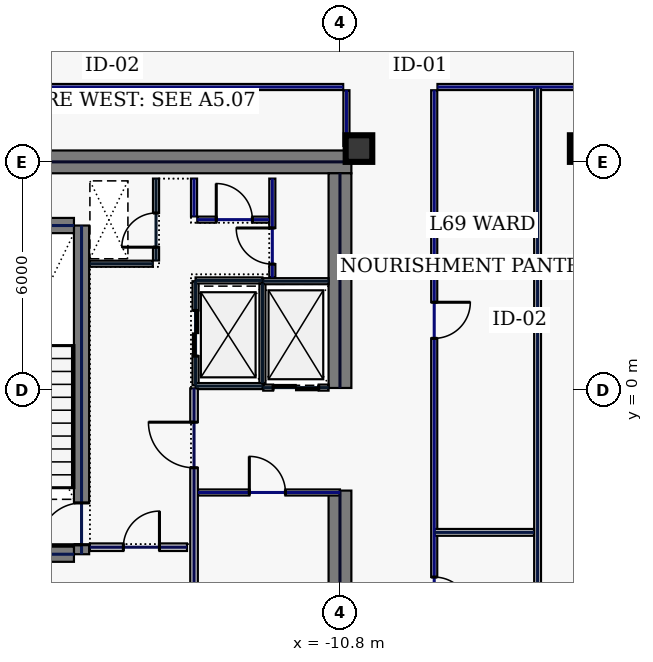
"""IFC4 building model, lengths in metres.
Left out: names, types, materials, properties, quantities, classifications, styles, units other than length and angle.
Written with IfcOpenShell. Run it as: python <this file> out.ifc"""

import sys

from ifc_helpers import new_model, si_unit, direction, frame, frame_2d, origin, origin_2d, place, context, subcontext, project, spatial, rectangle, hollow_rectangle, extrude, element, fill, save


model = new_model("IFC4")
c1 = context("Model", 3, precision=1e-05, world=origin(), true_north=direction((0.0, 1.0)))
c2 = subcontext(c1, "Body", "Model", "MODEL_VIEW")
j1 = project(units=[si_unit("LENGTHUNIT", "METRE"), si_unit("PLANEANGLEUNIT", "RADIAN")], contexts=[c1])
p1 = place(None, origin())
s1 = spatial("IfcSite", under=j1, at=p1, CompositionType="ELEMENT")
p2 = place(p1, origin())
s2 = spatial("IfcBuilding", under=s1, at=p2, CompositionType="ELEMENT")
p3 = place(p2, frame((0.0, 0.0, 297.0)))
s3 = spatial("IfcBuildingStorey", under=s2, at=p3, CompositionType="ELEMENT", Elevation=297.0)
p4 = place(p3, frame((-22.0, 6.0, 0.0), z_axis=(0.0, 0.0, 1.0), x_axis=(1.0, 0.0, 0.0)))
e1 = element("IfcWall", 1, at=p4, inside=s3, PredefinedType="SHEAR", context=c2, shape_type="SweptSolid", body=[
    extrude(rectangle(XDim=11.5, YDim=0.6, at=frame_2d((5.75, 0.0))), origin(), (0.0, 0.0, 1.0), 3.74),
])
p5 = place(p3, frame((-10.8, -5.7, 0.0), z_axis=(0.0, 0.0, 1.0), x_axis=(0.0, 1.0, 0.0)))
e2 = element("IfcWall", 2, at=p5, inside=s3, PredefinedType="SHEAR", context=c2, shape_type="SweptSolid", body=[
    extrude(rectangle(XDim=3.05, YDim=0.6, at=frame_2d((1.525, 0.0))), origin(), (0.0, 0.0, 1.0), 3.74),
])
p6 = place(p3, frame((-10.8, 0.05, 0.0), z_axis=(0.0, 0.0, 1.0), x_axis=(0.0, 1.0, 0.0)))
e3 = element("IfcWall", 3, at=p6, inside=s3, PredefinedType="SHEAR", context=c2, shape_type="SweptSolid", body=[
    extrude(rectangle(XDim=5.65, YDim=0.6, at=frame_2d((2.825, 0.0))), origin(), (0.0, 0.0, 1.0), 3.74),
])
p7 = place(p3, frame((-17.6, -4.325, 0.0), z_axis=(0.0, 0.0, 1.0), x_axis=(0.0, 1.0, 0.0)))
e4 = element("IfcWall", 4, at=p7, inside=s3, PredefinedType="SHEAR", context=c2, shape_type="SweptSolid", body=[
    extrude(rectangle(XDim=8.65, YDim=0.4, at=frame_2d((4.325, 0.0))), origin(), (0.0, 0.0, 1.0), 3.74),
])
p8 = place(p7, frame((0.25, 0.0, 0.0)))
e5 = element("IfcOpeningElement", 5, at=p8, cuts=e4, PredefinedType="OPENING", context=c2, shape_type="SweptSolid", body=[
    extrude(rectangle(XDim=1.1, YDim=2.2, at=frame_2d((0.55, 1.1))), frame((0.0, 0.21, 0.0), z_axis=(0.0, -1.0, 0.0), x_axis=(1.0, 0.0, 0.0)), (0.0, 0.0, 1.0), 0.42),
])
for number, where, z_axis, x_axis in (
    (6, (-21.2, -4.325, 0.0), (0.0, 0.0, 1.0), (1.0, 0.0, 0.0)),
    (7, (-21.2, 4.325, 0.0), (0.0, 0.0, 1.0), (1.0, 0.0, 0.0)),
):
    element("IfcWall", number, at=place(p3, frame(where, z_axis=z_axis, x_axis=x_axis)), inside=s3, PredefinedType="SHEAR", context=c2, shape_type="SweptSolid", body=[
        extrude(rectangle(XDim=3.4, YDim=0.4, at=frame_2d((1.7, 0.0))), origin(), (0.0, 0.0, 1.0), 3.74),
    ])
for number, where, z_axis, x_axis in (
    (8, (-10.3, 6.35, 0.0), (0.0, 0.0, 1.0), (1.0, 0.0, 0.0)),
    (9, (-4.4, 6.35, 0.0), (0.0, 0.0, 1.0), (1.0, 0.0, 0.0)),
):
    element("IfcColumn", number, at=place(p3, frame(where, z_axis=z_axis, x_axis=x_axis)), inside=s3, PredefinedType="COLUMN", context=c2, shape_type="SweptSolid", body=[
        extrude(hollow_rectangle(XDim=0.7, YDim=0.7, WallThickness=0.032, at=origin_2d()), origin(), (0.0, 0.0, 1.0), 3.74),
    ])
p9 = place(p3, frame((-14.6, 0.12, 0.0), z_axis=(0.0, 0.0, 1.0), x_axis=(0.0, 1.0, 0.0)))
e10 = element("IfcWall", 10, at=p9, inside=s3, PredefinedType="PARTITIONING", context=c2, shape_type="SweptSolid", body=[
    extrude(rectangle(XDim=2.74, YDim=0.16, at=frame_2d((1.37, 0.0))), origin(), (0.0, 0.0, 1.0), 3.74),
])
p10 = place(p9, frame((0.77, 0.0, 0.0)))
e11 = element("IfcOpeningElement", 11, at=p10, cuts=e10, PredefinedType="OPENING", context=c2, shape_type="SweptSolid", body=[
    extrude(rectangle(XDim=1.2, YDim=2.2, at=frame_2d((0.6, 1.1))), frame((0.0, 0.09, 0.0), z_axis=(0.0, -1.0, 0.0), x_axis=(1.0, 0.0, 0.0)), (0.0, 0.0, 1.0), 0.18),
])
for number, where, z_axis, x_axis in (
    (12, (-14.6, 0.1, 0.0), (0.0, 0.0, 1.0), (1.0, 0.0, 0.0)),
    (13, (-14.6, 2.88, 0.0), (0.0, 0.0, 1.0), (1.0, 0.0, 0.0)),
):
    element("IfcWall", number, at=place(p3, frame(where, z_axis=z_axis, x_axis=x_axis)), inside=s3, PredefinedType="PARTITIONING", context=c2, shape_type="SweptSolid", body=[
        extrude(rectangle(XDim=1.76, YDim=0.16, at=frame_2d((0.88, 0.0))), origin(), (0.0, 0.0, 1.0), 3.74),
    ])
p11 = place(p3, frame((-12.84, 0.18, 0.0), z_axis=(0.0, 0.0, 1.0), x_axis=(0.0, 1.0, 0.0)))
e14 = element("IfcWall", 14, at=p11, inside=s3, PredefinedType="PARTITIONING", context=c2, shape_type="SweptSolid", body=[
    extrude(rectangle(XDim=2.62, YDim=0.16, at=frame_2d((1.31, 0.0))), origin(), (0.0, 0.0, 1.0), 3.74),
])
p12 = place(p3, frame((-12.82, 0.06, 0.0), z_axis=(0.0, 0.0, 1.0), x_axis=(1.0, 0.0, 0.0)))
e15 = element("IfcWall", 15, at=p12, inside=s3, PredefinedType="PARTITIONING", context=c2, shape_type="SweptSolid", body=[
    extrude(rectangle(XDim=1.72, YDim=0.16, at=frame_2d((0.86, 0.0))), origin(), (0.0, 0.0, 1.0), 3.74),
])
p13 = place(p12, frame((0.26, 0.0, 0.0)))
e16 = element("IfcOpeningElement", 16, at=p13, cuts=e15, PredefinedType="OPENING", context=c2, shape_type="SweptSolid", body=[
    extrude(rectangle(XDim=1.2, YDim=2.2, at=frame_2d((0.6, 1.1))), frame((0.0, 0.09, 0.0), z_axis=(0.0, -1.0, 0.0), x_axis=(1.0, 0.0, 0.0)), (0.0, 0.0, 1.0), 0.18),
])
p14 = place(p3, frame((-12.82, 2.86, 0.0), z_axis=(0.0, 0.0, 1.0), x_axis=(1.0, 0.0, 0.0)))
e17 = element("IfcWall", 17, at=p14, inside=s3, PredefinedType="PARTITIONING", context=c2, shape_type="SweptSolid", body=[
    extrude(rectangle(XDim=1.72, YDim=0.16, at=frame_2d((0.86, 0.0))), origin(), (0.0, 0.0, 1.0), 3.74),
])
p15 = place(p3, frame((-15.64, 3.405, 0.0), z_axis=(0.0, 0.0, 1.0), x_axis=(0.0, 1.0, 0.0)))
e18 = element("IfcWall", 18, at=p15, inside=s3, PredefinedType="PARTITIONING", context=c2, shape_type="SweptSolid", body=[
    extrude(rectangle(XDim=2.155, YDim=0.16, at=frame_2d((1.078, 0.0))), origin(), (0.0, 0.0, 1.0), 3.74),
])
p16 = place(p15, frame((0.35, 0.0, 0.0)))
e19 = element("IfcOpeningElement", 19, at=p16, cuts=e18, PredefinedType="OPENING", context=c2, shape_type="SweptSolid", body=[
    extrude(rectangle(XDim=0.9, YDim=2.2, at=frame_2d((0.45, 1.1))), frame((0.0, 0.09, 0.0), z_axis=(0.0, -1.0, 0.0), x_axis=(1.0, 0.0, 0.0)), (0.0, 0.0, 1.0), 0.18),
])
p17 = place(p3, frame((-17.38, 3.32, 0.0), z_axis=(0.0, 0.0, 1.0), x_axis=(1.0, 0.0, 0.0)))
e20 = element("IfcWall", 20, at=p17, inside=s3, PredefinedType="PARTITIONING", context=c2, shape_type="SweptSolid", body=[
    extrude(rectangle(XDim=1.655, YDim=0.16, at=frame_2d((0.827, 0.0))), origin(), (0.0, 0.0, 1.0), 3.74),
])
p18 = place(p3, frame((-17.38, -4.14, 0.0), z_axis=(0.0, 0.0, 1.0), x_axis=(1.0, 0.0, 0.0)))
e21 = element("IfcWall", 21, at=p18, inside=s3, PredefinedType="SOLIDWALL", context=c2, shape_type="SweptSolid", body=[
    extrude(rectangle(XDim=2.555, YDim=0.2, at=frame_2d((1.277, 0.0))), origin(), (0.0, 0.0, 1.0), 3.74),
])
p19 = place(p18, frame((0.88, 0.0, 0.0)))
e22 = element("IfcOpeningElement", 22, at=p19, cuts=e21, PredefinedType="OPENING", context=c2, shape_type="SweptSolid", body=[
    extrude(rectangle(XDim=0.95, YDim=2.2, at=frame_2d((0.475, 1.1))), frame((0.0, 0.11, 0.0), z_axis=(0.0, -1.0, 0.0), x_axis=(1.0, 0.0, 0.0)), (0.0, 0.0, 1.0), 0.22),
])
p20 = place(p3, frame((-14.535, -2.7, 0.0), z_axis=(0.0, 0.0, 1.0), x_axis=(1.0, 0.0, 0.0)))
e23 = element("IfcWall", 23, at=p20, inside=s3, PredefinedType="PARTITIONING", context=c2, shape_type="SweptSolid", body=[
    extrude(rectangle(XDim=3.735, YDim=0.16, at=frame_2d((1.867, 0.0))), origin(), (0.0, 0.0, 1.0), 3.74),
])
p21 = place(p20, frame((1.35, 0.0, 0.0)))
e24 = element("IfcOpeningElement", 24, at=p21, cuts=e23, PredefinedType="OPENING", context=c2, shape_type="SweptSolid", body=[
    extrude(rectangle(XDim=0.95, YDim=2.2, at=frame_2d((0.475, 1.1))), frame((0.0, 0.09, 0.0), z_axis=(0.0, -1.0, 0.0), x_axis=(1.0, 0.0, 0.0)), (0.0, 0.0, 1.0), 0.18),
])
p22 = place(p3, frame((-12.58, 2.96, 0.0), z_axis=(0.0, 0.0, 1.0), x_axis=(0.0, 1.0, 0.0)))
e25 = element("IfcWall", 25, at=p22, inside=s3, PredefinedType="PARTITIONING", context=c2, shape_type="SweptSolid", body=[
    extrude(rectangle(XDim=2.6, YDim=0.16, at=frame_2d((1.3, 0.0))), origin(), (0.0, 0.0, 1.0), 3.74),
])
p23 = place(p22, frame((0.35, 0.0, 0.0)))
e26 = element("IfcOpeningElement", 26, at=p23, cuts=e25, PredefinedType="OPENING", context=c2, shape_type="SweptSolid", body=[
    extrude(rectangle(XDim=0.95, YDim=2.2, at=frame_2d((0.475, 1.1))), frame((0.0, 0.09, 0.0), z_axis=(0.0, -1.0, 0.0), x_axis=(1.0, 0.0, 0.0)), (0.0, 0.0, 1.0), 0.18),
])
p24 = place(p3, frame((-14.555, 4.48, 0.0), z_axis=(0.0, 0.0, 1.0), x_axis=(1.0, 0.0, 0.0)))
e27 = element("IfcWall", 27, at=p24, inside=s3, PredefinedType="PARTITIONING", context=c2, shape_type="SweptSolid", body=[
    extrude(rectangle(XDim=1.89, YDim=0.16, at=frame_2d((0.945, 0.0))), origin(), (0.0, 0.0, 1.0), 3.74),
])
p25 = place(p24, frame((0.5, 0.0, 0.0)))
e28 = element("IfcOpeningElement", 28, at=p25, cuts=e27, PredefinedType="OPENING", context=c2, shape_type="SweptSolid", body=[
    extrude(rectangle(XDim=0.95, YDim=2.2, at=frame_2d((0.475, 1.1))), frame((0.0, 0.09, 0.0), z_axis=(0.0, -1.0, 0.0), x_axis=(1.0, 0.0, 0.0)), (0.0, 0.0, 1.0), 0.18),
])
p26 = place(p3, frame((-14.64, 4.565, 0.0), z_axis=(0.0, 0.0, 1.0), x_axis=(0.0, 1.0, 0.0)))
e29 = element("IfcWall", 29, at=p26, inside=s3, PredefinedType="PARTITIONING", context=c2, shape_type="SweptSolid", body=[
    extrude(rectangle(XDim=0.995, YDim=0.16, at=frame_2d((0.498, 0.0))), origin(), (0.0, 0.0, 1.0), 3.74),
])
p27 = place(p3, frame((-14.64, -5.56, 0.0), z_axis=(0.0, 0.0, 1.0), x_axis=(0.0, 1.0, 0.0)))
e30 = element("IfcWall", 30, at=p27, inside=s3, PredefinedType="SOLIDWALL", context=c2, shape_type="SweptSolid", body=[
    extrude(rectangle(XDim=5.6, YDim=0.2, at=frame_2d((2.8, 0.0))), origin(), (0.0, 0.0, 1.0), 3.74),
])
p28 = place(p27, frame((3.51, 0.0, 0.0)))
e31 = element("IfcOpeningElement", 31, at=p28, cuts=e30, PredefinedType="OPENING", context=c2, shape_type="SweptSolid", body=[
    extrude(rectangle(XDim=1.2, YDim=2.2, at=frame_2d((0.6, 1.1))), frame((0.0, 0.11, 0.0), z_axis=(0.0, -1.0, 0.0), x_axis=(1.0, 0.0, 0.0)), (0.0, 0.0, 1.0), 0.22),
])
p29 = place(p3, frame((-3.965, 7.97, 0.0), z_axis=(0.0, 0.0, 1.0), x_axis=(-1.0, 0.0, 0.0)))
e32 = element("IfcWall", 32, at=p29, inside=s3, PredefinedType="PARTITIONING", context=c2, shape_type="SweptSolid", body=[
    extrude(rectangle(XDim=4.27, YDim=0.16, at=frame_2d((2.135, 0.0))), origin(), (0.0, 0.0, 1.0), 3.74),
])
p30 = place(p3, frame((-8.32, 7.885, 0.0), z_axis=(0.0, 0.0, 1.0), x_axis=(0.0, -1.0, 0.0)))
e33 = element("IfcWall", 33, at=p30, inside=s3, PredefinedType="PARTITIONING", context=c2, shape_type="SweptSolid", body=[
    extrude(rectangle(XDim=15.67, YDim=0.16, at=frame_2d((7.835, 0.0))), origin(), (0.0, 0.0, 1.0), 3.74),
])
p31 = place(p30, frame((12.811, 0.0, 0.0)))
e34 = element("IfcOpeningElement", 34, at=p31, cuts=e33, PredefinedType="OPENING", context=c2, shape_type="SweptSolid", body=[
    extrude(rectangle(XDim=0.95, YDim=2.2, at=frame_2d((0.475, 1.1))), frame((0.0, 0.09, 0.0), z_axis=(0.0, -1.0, 0.0), x_axis=(1.0, 0.0, 0.0)), (0.0, 0.0, 1.0), 0.18),
])
p32 = place(p30, frame((5.579, 0.0, 0.0)))
e35 = element("IfcOpeningElement", 35, at=p32, cuts=e33, PredefinedType="OPENING", context=c2, shape_type="SweptSolid", body=[
    extrude(rectangle(XDim=0.95, YDim=2.2, at=frame_2d((0.475, 1.1))), frame((0.0, 0.09, 0.0), z_axis=(0.0, -1.0, 0.0), x_axis=(1.0, 0.0, 0.0)), (0.0, 0.0, 1.0), 0.18),
])
p33 = place(p3, frame((-10.63, 6.42, 0.0), z_axis=(0.0, 0.0, 1.0), x_axis=(0.0, 1.0, 0.0)))
e36 = element("IfcWall", 36, at=p33, inside=s3, PredefinedType="PARTITIONING", context=c2, shape_type="SweptSolid", body=[
    extrude(rectangle(XDim=1.465, YDim=0.16, at=frame_2d((0.732, 0.0))), origin(), (0.0, 0.0, 1.0), 3.74),
])
p34 = place(p3, frame((-10.715, 7.97, 0.0), z_axis=(0.0, 0.0, 1.0), x_axis=(-1.0, 0.0, 0.0)))
e37 = element("IfcWall", 37, at=p34, inside=s3, PredefinedType="PARTITIONING", context=c2, shape_type="SweptSolid", body=[
    extrude(rectangle(XDim=11.2, YDim=0.16, at=frame_2d((5.6, 0.0))), origin(), (0.0, 0.0, 1.0), 3.74),
])
p35 = place(p3, frame((-5.6, -7.865, 0.0), z_axis=(0.0, 0.0, 1.0), x_axis=(0.0, 1.0, 0.0)))
e38 = element("IfcWall", 38, at=p35, inside=s3, PredefinedType="PARTITIONING", context=c2, shape_type="SweptSolid", body=[
    extrude(rectangle(XDim=15.83, YDim=0.18, at=frame_2d((7.915, 0.0))), origin(), (0.0, 0.0, 1.0), 3.74),
])
p36 = place(p3, frame((-8.315, -3.75, 0.0), z_axis=(0.0, 0.0, 1.0), x_axis=(1.0, 0.0, 0.0)))
e39 = element("IfcWall", 39, at=p36, inside=s3, PredefinedType="PARTITIONING", context=c2, shape_type="SweptSolid", body=[
    extrude(rectangle(XDim=2.62, YDim=0.18, at=frame_2d((1.31, 0.0))), origin(), (0.0, 0.0, 1.0), 3.74),
])
p37 = place(p8, origin())
e40 = element("IfcDoor", 40, at=p37, inside=s3, OperationType="SINGLE_SWING_LEFT", PredefinedType="DOOR", context=c2, shape_type="SweptSolid", body=[
    extrude(rectangle(XDim=1.1, YDim=2.2, at=frame_2d((0.55, 1.1))), frame((0.0, 0.025, 0.0), z_axis=(0.0, -1.0, 0.0), x_axis=(1.0, 0.0, 0.0)), (0.0, 0.0, 1.0), 0.05),
])
fill(e5, e40)
p38 = place(p10, origin())
e41 = element("IfcDoor", 41, at=p38, inside=s3, OperationType="SLIDING_TO_LEFT", PredefinedType="DOOR", context=c2, shape_type="SweptSolid", body=[
    extrude(rectangle(XDim=1.2, YDim=2.2, at=frame_2d((0.6, 1.1))), frame((0.0, 0.025, 0.0), z_axis=(0.0, -1.0, 0.0), x_axis=(1.0, 0.0, 0.0)), (0.0, 0.0, 1.0), 0.05),
])
fill(e11, e41)
p39 = place(p13, origin())
e42 = element("IfcDoor", 42, at=p39, inside=s3, OperationType="SLIDING_TO_LEFT", PredefinedType="DOOR", context=c2, shape_type="SweptSolid", body=[
    extrude(rectangle(XDim=1.2, YDim=2.2, at=frame_2d((0.6, 1.1))), frame((0.0, 0.025, 0.0), z_axis=(0.0, -1.0, 0.0), x_axis=(1.0, 0.0, 0.0)), (0.0, 0.0, 1.0), 0.05),
])
fill(e16, e42)
p40 = place(p16, origin())
e43 = element("IfcDoor", 43, at=p40, inside=s3, OperationType="SINGLE_SWING_LEFT", PredefinedType="DOOR", context=c2, shape_type="SweptSolid", body=[
    extrude(rectangle(XDim=0.9, YDim=2.2, at=frame_2d((0.45, 1.1))), frame((0.0, 0.025, 0.0), z_axis=(0.0, -1.0, 0.0), x_axis=(1.0, 0.0, 0.0)), (0.0, 0.0, 1.0), 0.05),
])
fill(e19, e43)
p41 = place(p19, origin())
e44 = element("IfcDoor", 44, at=p41, inside=s3, OperationType="SINGLE_SWING_RIGHT", PredefinedType="DOOR", context=c2, shape_type="SweptSolid", body=[
    extrude(rectangle(XDim=0.95, YDim=2.2, at=frame_2d((0.475, 1.1))), frame((0.0, 0.025, 0.0), z_axis=(0.0, -1.0, 0.0), x_axis=(1.0, 0.0, 0.0)), (0.0, 0.0, 1.0), 0.05),
])
fill(e22, e44)
p42 = place(p21, origin())
e45 = element("IfcDoor", 45, at=p42, inside=s3, OperationType="SINGLE_SWING_LEFT", PredefinedType="DOOR", context=c2, shape_type="SweptSolid", body=[
    extrude(rectangle(XDim=0.95, YDim=2.2, at=frame_2d((0.475, 1.1))), frame((0.0, 0.025, 0.0), z_axis=(0.0, -1.0, 0.0), x_axis=(1.0, 0.0, 0.0)), (0.0, 0.0, 1.0), 0.05),
])
fill(e24, e45)
p43 = place(p23, origin())
e46 = element("IfcDoor", 46, at=p43, inside=s3, OperationType="SINGLE_SWING_RIGHT", PredefinedType="DOOR", context=c2, shape_type="SweptSolid", body=[
    extrude(rectangle(XDim=0.95, YDim=2.2, at=frame_2d((0.475, 1.1))), frame((0.0, 0.025, 0.0), z_axis=(0.0, -1.0, 0.0), x_axis=(1.0, 0.0, 0.0)), (0.0, 0.0, 1.0), 0.05),
])
fill(e26, e46)
p44 = place(p25, origin())
e47 = element("IfcDoor", 47, at=p44, inside=s3, OperationType="SINGLE_SWING_LEFT", PredefinedType="DOOR", context=c2, shape_type="SweptSolid", body=[
    extrude(rectangle(XDim=0.95, YDim=2.2, at=frame_2d((0.475, 1.1))), frame((0.0, 0.025, 0.0), z_axis=(0.0, -1.0, 0.0), x_axis=(1.0, 0.0, 0.0)), (0.0, 0.0, 1.0), 0.05),
])
fill(e28, e47)
p45 = place(p28, origin())
e48 = element("IfcDoor", 48, at=p45, inside=s3, OperationType="SINGLE_SWING_RIGHT", PredefinedType="DOOR", context=c2, shape_type="SweptSolid", body=[
    extrude(rectangle(XDim=1.2, YDim=2.2, at=frame_2d((0.6, 1.1))), frame((0.0, 0.025, 0.0), z_axis=(0.0, -1.0, 0.0), x_axis=(1.0, 0.0, 0.0)), (0.0, 0.0, 1.0), 0.05),
])
fill(e31, e48)
p46 = place(p31, origin())
e49 = element("IfcDoor", 49, at=p46, inside=s3, OperationType="SINGLE_SWING_RIGHT", PredefinedType="DOOR", context=c2, shape_type="SweptSolid", body=[
    extrude(rectangle(XDim=0.95, YDim=2.2, at=frame_2d((0.475, 1.1))), frame((0.0, 0.025, 0.0), z_axis=(0.0, -1.0, 0.0), x_axis=(1.0, 0.0, 0.0)), (0.0, 0.0, 1.0), 0.05),
])
fill(e34, e49)
p47 = place(p32, origin())
e50 = element("IfcDoor", 50, at=p47, inside=s3, OperationType="SINGLE_SWING_LEFT", PredefinedType="DOOR", context=c2, shape_type="SweptSolid", body=[
    extrude(rectangle(XDim=0.95, YDim=2.2, at=frame_2d((0.475, 1.1))), frame((0.0, 0.025, 0.0), z_axis=(0.0, -1.0, 0.0), x_axis=(1.0, 0.0, 0.0)), (0.0, 0.0, 1.0), 0.05),
])
fill(e35, e50)
save(model, sys.argv[1])
